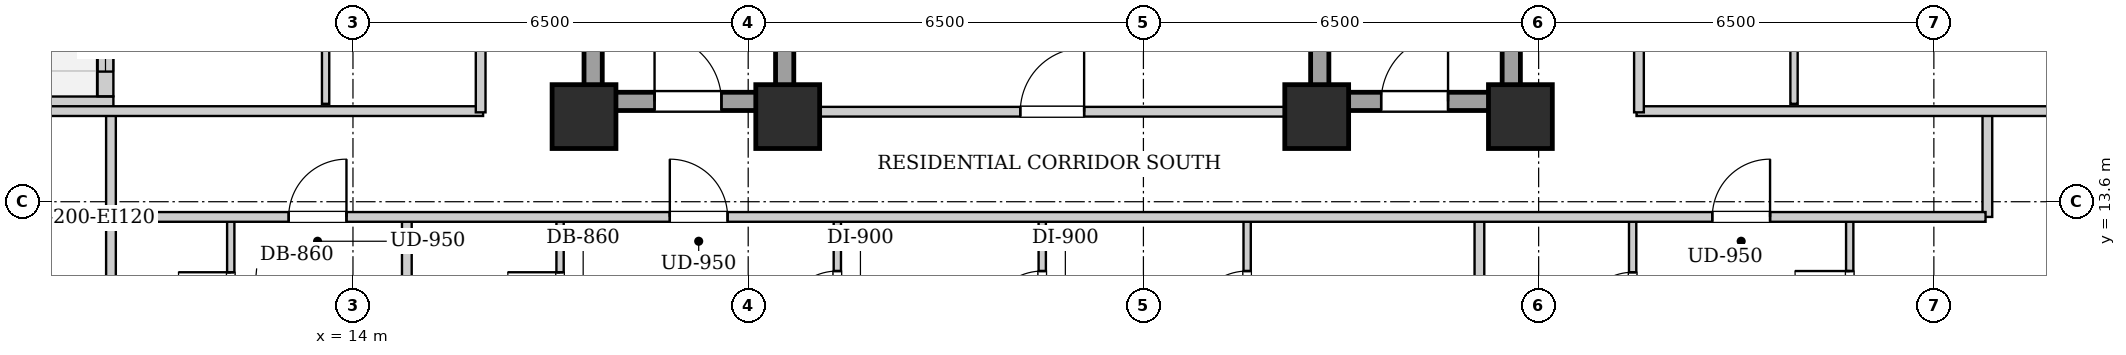
"""IFC4 building model, lengths in metres.
Left out: names, types, materials, properties, quantities, classifications, styles, units other than length and angle.
Written with IfcOpenShell. Run it as: python <this file> out.ifc"""

import sys

from ifc_helpers import new_model, si_unit, direction, frame, frame_2d, origin, origin_2d, place, context, subcontext, project, spatial, rectangle, extrude, element, fill, save


model = new_model("IFC4")
c1 = context("Model", 3, precision=1e-05, world=origin(), true_north=direction((0.0, 1.0)))
c2 = subcontext(c1, "Body", "Model", "MODEL_VIEW")
j1 = project(units=[si_unit("LENGTHUNIT", "METRE"), si_unit("PLANEANGLEUNIT", "RADIAN")], contexts=[c1])
p1 = place(None, origin())
s1 = spatial("IfcSite", under=j1, at=p1, CompositionType="ELEMENT")
p2 = place(p1, origin())
s2 = spatial("IfcBuilding", under=s1, at=p2, CompositionType="ELEMENT")
p3 = place(p2, frame((0.0, 0.0, 107.1)))
s3 = spatial("IfcBuildingStorey", under=s2, at=p3, CompositionType="ELEMENT", Elevation=107.1)
for number, where, z_axis, x_axis in (
    (1, (17.8, 15.0, 0.0), (0.0, 0.0, 1.0), (1.0, 0.0, 0.0)),
    (2, (21.15, 15.0, 0.0), (0.0, 0.0, 1.0), (1.0, 0.0, 0.0)),
    (3, (29.85, 15.0, 0.0), (0.0, 0.0, 1.0), (1.0, 0.0, 0.0)),
    (4, (33.2, 15.0, 0.0), (0.0, 0.0, 1.0), (1.0, 0.0, 0.0)),
):
    element("IfcColumn", number, at=place(p3, frame(where, z_axis=z_axis, x_axis=x_axis)), inside=s3, PredefinedType="COLUMN", context=c2, shape_type="SweptSolid", body=[
        extrude(rectangle(XDim=1.05, YDim=1.05, at=origin_2d()), origin(), (0.0, 0.0, 1.0), 3.2),
    ])
p4 = place(p3, frame((7.66, 15.2, 0.0), z_axis=(0.0, 0.0, 1.0), x_axis=(1.0, 0.0, 0.0)))
e5 = element("IfcWall", 5, at=p4, inside=s3, PredefinedType="SOLIDWALL", context=c2, shape_type="SweptSolid", body=[
    extrude(rectangle(XDim=2.4, YDim=0.26, at=frame_2d((1.2, 0.0))), origin(), (0.0, 0.0, 1.0), 2.94),
])
p5 = place(p3, frame((9.93, 15.334, 0.0), z_axis=(0.0, 0.0, 1.0), x_axis=(0.0, 1.0, 0.0)))
e6 = element("IfcWall", 6, at=p5, inside=s3, PredefinedType="SOLIDWALL", context=c2, shape_type="SweptSolid", body=[
    extrude(rectangle(XDim=3.932, YDim=0.26, at=frame_2d((1.966, 0.0))), origin(), (0.0, 0.0, 1.0), 2.94),
])
p6 = place(p5, frame((1.416, 0.0, 0.0)))
e7 = element("IfcOpeningElement", 7, at=p6, cuts=e6, PredefinedType="OPENING", context=c2, shape_type="SweptSolid", body=[
    extrude(rectangle(XDim=1.1, YDim=2.0, at=frame_2d((0.55, 1.0))), frame((0.0, 0.14, 0.0), z_axis=(0.0, -1.0, 0.0), x_axis=(1.0, 0.0, 0.0)), (0.0, 0.0, 1.0), 0.28),
])
p7 = place(p5, frame((0.406, 0.0, 0.55)))
e8 = element("IfcOpeningElement", 8, at=p7, cuts=e6, PredefinedType="OPENING", context=c2, shape_type="SweptSolid", body=[
    extrude(rectangle(XDim=0.85, YDim=1.2, at=frame_2d((0.425, 0.6))), frame((0.0, 0.14, 0.0), z_axis=(0.0, -1.0, 0.0), x_axis=(1.0, 0.0, 0.0)), (0.0, 0.0, 1.0), 0.28),
])
for number, where, z_axis, x_axis in (
    (9, (17.95, 15.1, 0.0), (0.0, 0.0, 1.0), (0.0, 1.0, 0.0)),
    (10, (21.1, 15.1, 0.0), (0.0, 0.0, 1.0), (0.0, 1.0, 0.0)),
):
    element("IfcWall", number, at=place(p3, frame(where, z_axis=z_axis, x_axis=x_axis)), inside=s3, PredefinedType="SHEAR", context=c2, shape_type="SweptSolid", body=[
        extrude(rectangle(XDim=9.0, YDim=0.3, at=frame_2d((4.5, 0.0))), origin(), (0.0, 0.0, 1.0), 2.94),
    ])
p8 = place(p3, frame((18.1, 15.25, 0.0), z_axis=(0.0, 0.0, 1.0), x_axis=(1.0, 0.0, 0.0)))
e11 = element("IfcWall", 11, at=p8, inside=s3, PredefinedType="SHEAR", context=c2, shape_type="SweptSolid", body=[
    extrude(rectangle(XDim=2.85, YDim=0.3, at=frame_2d((1.425, 0.0))), origin(), (0.0, 0.0, 1.0), 2.94),
])
p9 = place(p8, frame((0.86, 0.0, 0.0)))
e12 = element("IfcOpeningElement", 12, at=p9, cuts=e11, PredefinedType="OPENING", context=c2, shape_type="SweptSolid", body=[
    extrude(rectangle(XDim=1.1, YDim=2.05, at=frame_2d((0.55, 1.025))), frame((0.0, 0.16, 0.0), z_axis=(0.0, -1.0, 0.0), x_axis=(1.0, 0.0, 0.0)), (0.0, 0.0, 1.0), 0.32),
])
for number, where, z_axis, x_axis in (
    (13, (29.9, 15.1, 0.0), (0.0, 0.0, 1.0), (0.0, 1.0, 0.0)),
    (14, (33.05, 15.1, 0.0), (0.0, 0.0, 1.0), (0.0, 1.0, 0.0)),
):
    element("IfcWall", number, at=place(p3, frame(where, z_axis=z_axis, x_axis=x_axis)), inside=s3, PredefinedType="SHEAR", context=c2, shape_type="SweptSolid", body=[
        extrude(rectangle(XDim=9.0, YDim=0.3, at=frame_2d((4.5, 0.0))), origin(), (0.0, 0.0, 1.0), 2.94),
    ])
p10 = place(p3, frame((30.05, 15.25, 0.0), z_axis=(0.0, 0.0, 1.0), x_axis=(1.0, 0.0, 0.0)))
e15 = element("IfcWall", 15, at=p10, inside=s3, PredefinedType="SHEAR", context=c2, shape_type="SweptSolid", body=[
    extrude(rectangle(XDim=2.85, YDim=0.3, at=frame_2d((1.425, 0.0))), origin(), (0.0, 0.0, 1.0), 2.94),
])
p11 = place(p10, frame((0.86, 0.0, 0.0)))
e16 = element("IfcOpeningElement", 16, at=p11, cuts=e15, PredefinedType="OPENING", context=c2, shape_type="SweptSolid", body=[
    extrude(rectangle(XDim=1.1, YDim=2.05, at=frame_2d((0.55, 1.025))), frame((0.0, 0.16, 0.0), z_axis=(0.0, -1.0, 0.0), x_axis=(1.0, 0.0, 0.0)), (0.0, 0.0, 1.0), 0.32),
])
p12 = place(p3, frame((21.25, 15.08, 0.0), z_axis=(0.0, 0.0, 1.0), x_axis=(1.0, 0.0, 0.0)))
e17 = element("IfcWall", 17, at=p12, inside=s3, PredefinedType="PARTITIONING", context=c2, shape_type="SweptSolid", body=[
    extrude(rectangle(XDim=8.5, YDim=0.16, at=frame_2d((4.25, 0.0))), origin(), (0.0, 0.0, 1.0), 2.313),
])
p13 = place(p12, frame((3.725, 0.0, 0.0)))
e18 = element("IfcOpeningElement", 18, at=p13, cuts=e17, PredefinedType="OPENING", context=c2, shape_type="SweptSolid", body=[
    extrude(rectangle(XDim=1.05, YDim=2.05, at=frame_2d((0.525, 1.025))), frame((0.0, 0.09, 0.0), z_axis=(0.0, -1.0, 0.0), x_axis=(1.0, 0.0, 0.0)), (0.0, 0.0, 1.0), 0.18),
])
for number, where, z_axis, x_axis in (
    (19, (10.02, 13.35, 0.0), (0.0, 0.0, 1.0), (0.0, 1.0, 0.0)),
    (20, (40.88, 13.35, 0.0), (0.0, 0.0, 1.0), (0.0, 1.0, 0.0)),
):
    element("IfcWall", number, at=place(p3, frame(where, z_axis=z_axis, x_axis=x_axis)), inside=s3, PredefinedType="PARTITIONING", context=c2, shape_type="SweptSolid", body=[
        extrude(rectangle(XDim=1.74, YDim=0.16, at=frame_2d((0.87, 0.0))), origin(), (0.0, 0.0, 1.0), 2.94),
    ])
p14 = place(p3, frame((7.78, 15.09, 0.0), z_axis=(0.0, 0.0, 1.0), x_axis=(1.0, 0.0, 0.0)))
e21 = element("IfcWall", 21, at=p14, inside=s3, PredefinedType="PARTITIONING", context=c2, shape_type="SweptSolid", body=[
    extrude(rectangle(XDim=8.36, YDim=0.16, at=frame_2d((4.18, 0.0))), origin(), (0.0, 0.0, 1.0), 2.313),
])
p15 = place(p3, frame((35.11, 15.09, 0.0), z_axis=(0.0, 0.0, 1.0), x_axis=(1.0, 0.0, 0.0)))
e22 = element("IfcWall", 22, at=p15, inside=s3, PredefinedType="PARTITIONING", context=c2, shape_type="SweptSolid", body=[
    extrude(rectangle(XDim=8.01, YDim=0.16, at=frame_2d((4.005, 0.0))), origin(), (0.0, 0.0, 1.0), 2.313),
])
p16 = place(p3, frame((10.02, 10.65, 0.0), z_axis=(0.0, 0.0, 1.0), x_axis=(0.0, 1.0, 0.0)))
e23 = element("IfcWall", 23, at=p16, inside=s3, PredefinedType="PARTITIONING", context=c2, shape_type="SweptSolid", body=[
    extrude(rectangle(XDim=2.66, YDim=0.16, at=frame_2d((1.33, 0.0))), origin(), (0.0, 0.0, 1.0), 2.94),
])
p17 = place(p3, frame((11.99, 10.71, 0.0), z_axis=(0.0, 0.0, 1.0), x_axis=(0.0, 1.0, 0.0)))
e24 = element("IfcWall", 24, at=p17, inside=s3, PredefinedType="PARTITIONING", context=c2, shape_type="SweptSolid", body=[
    extrude(rectangle(XDim=2.6, YDim=0.12, at=frame_2d((1.3, 0.0))), origin(), (0.0, 0.0, 1.0), 2.94),
])
p18 = place(p17, frame((0.87, 0.0, 0.0)))
e25 = element("IfcOpeningElement", 25, at=p18, cuts=e24, PredefinedType="OPENING", context=c2, shape_type="SweptSolid", body=[
    extrude(rectangle(XDim=0.86, YDim=2.05, at=frame_2d((0.43, 1.025))), frame((0.0, 0.07, 0.0), z_axis=(0.0, -1.0, 0.0), x_axis=(1.0, 0.0, 0.0)), (0.0, 0.0, 1.0), 0.14),
])
p19 = place(p3, frame((14.886, 2.26, 0.0), z_axis=(0.0, 0.0, 1.0), x_axis=(0.0, 1.0, 0.0)))
e26 = element("IfcWall", 26, at=p19, inside=s3, PredefinedType="PARTITIONING", context=c2, shape_type="SweptSolid", body=[
    extrude(rectangle(XDim=11.05, YDim=0.16, at=frame_2d((5.525, 0.0))), origin(), (0.0, 0.0, 1.0), 2.94),
])
p20 = place(p3, frame((17.406, 10.71, 0.0), z_axis=(0.0, 0.0, 1.0), x_axis=(0.0, 1.0, 0.0)))
e27 = element("IfcWall", 27, at=p20, inside=s3, PredefinedType="PARTITIONING", context=c2, shape_type="SweptSolid", body=[
    extrude(rectangle(XDim=2.6, YDim=0.12, at=frame_2d((1.3, 0.0))), origin(), (0.0, 0.0, 1.0), 2.94),
])
p21 = place(p20, frame((0.87, 0.0, 0.0)))
e28 = element("IfcOpeningElement", 28, at=p21, cuts=e27, PredefinedType="OPENING", context=c2, shape_type="SweptSolid", body=[
    extrude(rectangle(XDim=0.86, YDim=2.05, at=frame_2d((0.43, 1.025))), frame((0.0, 0.07, 0.0), z_axis=(0.0, -1.0, 0.0), x_axis=(1.0, 0.0, 0.0)), (0.0, 0.0, 1.0), 0.14),
])
p22 = place(p3, frame((21.966, 10.71, 0.0), z_axis=(0.0, 0.0, 1.0), x_axis=(0.0, 1.0, 0.0)))
e29 = element("IfcWall", 29, at=p22, inside=s3, PredefinedType="PARTITIONING", context=c2, shape_type="SweptSolid", body=[
    extrude(rectangle(XDim=2.6, YDim=0.12, at=frame_2d((1.3, 0.0))), origin(), (0.0, 0.0, 1.0), 2.94),
])
p23 = place(p22, frame((0.85, 0.0, 0.0)))
e30 = element("IfcOpeningElement", 30, at=p23, cuts=e29, PredefinedType="OPENING", context=c2, shape_type="SweptSolid", body=[
    extrude(rectangle(XDim=0.9, YDim=2.05, at=frame_2d((0.45, 1.025))), frame((0.0, 0.07, 0.0), z_axis=(0.0, -1.0, 0.0), x_axis=(1.0, 0.0, 0.0)), (0.0, 0.0, 1.0), 0.14),
])
p24 = place(p3, frame((25.336, 10.71, 0.0), z_axis=(0.0, 0.0, 1.0), x_axis=(0.0, 1.0, 0.0)))
e31 = element("IfcWall", 31, at=p24, inside=s3, PredefinedType="PARTITIONING", context=c2, shape_type="SweptSolid", body=[
    extrude(rectangle(XDim=2.6, YDim=0.12, at=frame_2d((1.3, 0.0))), origin(), (0.0, 0.0, 1.0), 2.94),
])
p25 = place(p24, frame((0.85, 0.0, 0.0)))
e32 = element("IfcOpeningElement", 32, at=p25, cuts=e31, PredefinedType="OPENING", context=c2, shape_type="SweptSolid", body=[
    extrude(rectangle(XDim=0.9, YDim=2.05, at=frame_2d((0.45, 1.025))), frame((0.0, 0.07, 0.0), z_axis=(0.0, -1.0, 0.0), x_axis=(1.0, 0.0, 0.0)), (0.0, 0.0, 1.0), 0.14),
])
p26 = place(p3, frame((28.706, 10.71, 0.0), z_axis=(0.0, 0.0, 1.0), x_axis=(0.0, 1.0, 0.0)))
e33 = element("IfcWall", 33, at=p26, inside=s3, PredefinedType="PARTITIONING", context=c2, shape_type="SweptSolid", body=[
    extrude(rectangle(XDim=2.6, YDim=0.12, at=frame_2d((1.3, 0.0))), origin(), (0.0, 0.0, 1.0), 2.94),
])
p27 = place(p26, frame((0.85, 0.0, 0.0)))
e34 = element("IfcOpeningElement", 34, at=p27, cuts=e33, PredefinedType="OPENING", context=c2, shape_type="SweptSolid", body=[
    extrude(rectangle(XDim=0.9, YDim=2.05, at=frame_2d((0.45, 1.025))), frame((0.0, 0.07, 0.0), z_axis=(0.0, -1.0, 0.0), x_axis=(1.0, 0.0, 0.0)), (0.0, 0.0, 1.0), 0.14),
])
p28 = place(p3, frame((32.526, 0.28, 0.0), z_axis=(0.0, 0.0, 1.0), x_axis=(0.0, 1.0, 0.0)))
e35 = element("IfcWall", 35, at=p28, inside=s3, PredefinedType="PARTITIONING", context=c2, shape_type="SweptSolid", body=[
    extrude(rectangle(XDim=13.03, YDim=0.16, at=frame_2d((6.515, 0.0))), origin(), (0.0, 0.0, 1.0), 2.94),
])
p29 = place(p3, frame((35.046, 10.71, 0.0), z_axis=(0.0, 0.0, 1.0), x_axis=(0.0, 1.0, 0.0)))
e36 = element("IfcWall", 36, at=p29, inside=s3, PredefinedType="PARTITIONING", context=c2, shape_type="SweptSolid", body=[
    extrude(rectangle(XDim=2.6, YDim=0.12, at=frame_2d((1.3, 0.0))), origin(), (0.0, 0.0, 1.0), 2.94),
])
p30 = place(p29, frame((0.87, 0.0, 0.0)))
e37 = element("IfcOpeningElement", 37, at=p30, cuts=e36, PredefinedType="OPENING", context=c2, shape_type="SweptSolid", body=[
    extrude(rectangle(XDim=0.86, YDim=2.05, at=frame_2d((0.43, 1.025))), frame((0.0, 0.07, 0.0), z_axis=(0.0, -1.0, 0.0), x_axis=(1.0, 0.0, 0.0)), (0.0, 0.0, 1.0), 0.14),
])
p31 = place(p3, frame((38.616, 10.71, 0.0), z_axis=(0.0, 0.0, 1.0), x_axis=(0.0, 1.0, 0.0)))
e38 = element("IfcWall", 38, at=p31, inside=s3, PredefinedType="PARTITIONING", context=c2, shape_type="SweptSolid", body=[
    extrude(rectangle(XDim=2.6, YDim=0.12, at=frame_2d((1.3, 0.0))), origin(), (0.0, 0.0, 1.0), 2.94),
])
p32 = place(p31, frame((0.85, 0.0, 0.0)))
e39 = element("IfcOpeningElement", 39, at=p32, cuts=e38, PredefinedType="OPENING", context=c2, shape_type="SweptSolid", body=[
    extrude(rectangle(XDim=0.9, YDim=2.05, at=frame_2d((0.45, 1.025))), frame((0.0, 0.07, 0.0), z_axis=(0.0, -1.0, 0.0), x_axis=(1.0, 0.0, 0.0)), (0.0, 0.0, 1.0), 0.14),
])
p33 = place(p3, frame((13.55, 15.21, 0.0), z_axis=(0.0, 0.0, 1.0), x_axis=(0.0, 1.0, 0.0)))
e40 = element("IfcWall", 40, at=p33, inside=s3, PredefinedType="PARTITIONING", context=c2, shape_type="SweptSolid", body=[
    extrude(rectangle(XDim=2.3, YDim=0.12, at=frame_2d((1.15, 0.0))), origin(), (0.0, 0.0, 1.0), 2.94),
])
p34 = place(p3, frame((37.7, 15.21, 0.0), z_axis=(0.0, 0.0, 1.0), x_axis=(0.0, 1.0, 0.0)))
e41 = element("IfcWall", 41, at=p34, inside=s3, PredefinedType="PARTITIONING", context=c2, shape_type="SweptSolid", body=[
    extrude(rectangle(XDim=1.85, YDim=0.12, at=frame_2d((0.925, 0.0))), origin(), (0.0, 0.0, 1.0), 2.94),
])
p35 = place(p3, frame((10.05, 13.35, 0.0), z_axis=(0.0, 0.0, 1.0), x_axis=(1.0, 0.0, 0.0)))
e42 = element("IfcWall", 42, at=p35, inside=s3, PredefinedType="PARTITIONING", context=c2, shape_type="SweptSolid", body=[
    extrude(rectangle(XDim=30.8, YDim=0.16, at=frame_2d((15.4, 0.0))), origin(), (0.0, 0.0, 1.0), 2.94),
])
p36 = place(p35, frame((2.893, 0.0, 0.0)))
e43 = element("IfcOpeningElement", 43, at=p36, cuts=e42, PredefinedType="OPENING", context=c2, shape_type="SweptSolid", body=[
    extrude(rectangle(XDim=0.95, YDim=2.1, at=frame_2d((0.475, 1.05))), frame((0.0, 0.09, 0.0), z_axis=(0.0, -1.0, 0.0), x_axis=(1.0, 0.0, 0.0)), (0.0, 0.0, 1.0), 0.18),
])
p37 = place(p35, frame((9.161, 0.0, 0.0)))
e44 = element("IfcOpeningElement", 44, at=p37, cuts=e42, PredefinedType="OPENING", context=c2, shape_type="SweptSolid", body=[
    extrude(rectangle(XDim=0.95, YDim=2.1, at=frame_2d((0.475, 1.05))), frame((0.0, 0.09, 0.0), z_axis=(0.0, -1.0, 0.0), x_axis=(1.0, 0.0, 0.0)), (0.0, 0.0, 1.0), 0.18),
])
p38 = place(p35, frame((26.306, 0.0, 0.0)))
e45 = element("IfcOpeningElement", 45, at=p38, cuts=e42, PredefinedType="OPENING", context=c2, shape_type="SweptSolid", body=[
    extrude(rectangle(XDim=0.95, YDim=2.1, at=frame_2d((0.475, 1.05))), frame((0.0, 0.09, 0.0), z_axis=(0.0, -1.0, 0.0), x_axis=(1.0, 0.0, 0.0)), (0.0, 0.0, 1.0), 0.18),
])
p39 = place(p3, frame((16.1, 15.07, 0.0), z_axis=(0.0, 0.0, 1.0), x_axis=(0.0, 1.0, 0.0)))
e46 = element("IfcWall", 46, at=p39, inside=s3, PredefinedType="PARTITIONING", context=c2, shape_type="SweptSolid", body=[
    extrude(rectangle(XDim=13.93, YDim=0.16, at=frame_2d((6.965, 0.0))), origin(), (0.0, 0.0, 1.0), 2.94),
])
p40 = place(p39, frame((4.385, 0.0, 0.0)))
e47 = element("IfcOpeningElement", 47, at=p40, cuts=e46, PredefinedType="OPENING", context=c2, shape_type="SweptSolid", body=[
    extrude(rectangle(XDim=0.95, YDim=2.1, at=frame_2d((0.475, 1.05))), frame((0.0, 0.09, 0.0), z_axis=(0.0, -1.0, 0.0), x_axis=(1.0, 0.0, 0.0)), (0.0, 0.0, 1.0), 0.18),
])
p41 = place(p3, frame((35.15, 15.07, 0.0), z_axis=(0.0, 0.0, 1.0), x_axis=(0.0, 1.0, 0.0)))
e48 = element("IfcWall", 48, at=p41, inside=s3, PredefinedType="PARTITIONING", context=c2, shape_type="SweptSolid", body=[
    extrude(rectangle(XDim=13.93, YDim=0.16, at=frame_2d((6.965, 0.0))), origin(), (0.0, 0.0, 1.0), 2.94),
])
p42 = place(p41, frame((3.608, 0.0, 0.0)))
e49 = element("IfcOpeningElement", 49, at=p42, cuts=e48, PredefinedType="OPENING", context=c2, shape_type="SweptSolid", body=[
    extrude(rectangle(XDim=0.95, YDim=2.1, at=frame_2d((0.475, 1.05))), frame((0.0, 0.09, 0.0), z_axis=(0.0, -1.0, 0.0), x_axis=(1.0, 0.0, 0.0)), (0.0, 0.0, 1.0), 0.18),
])
p43 = place(p41, frame((10.649, 0.0, 0.0)))
e50 = element("IfcOpeningElement", 50, at=p43, cuts=e48, PredefinedType="OPENING", context=c2, shape_type="SweptSolid", body=[
    extrude(rectangle(XDim=0.95, YDim=2.1, at=frame_2d((0.475, 1.05))), frame((0.0, 0.09, 0.0), z_axis=(0.0, -1.0, 0.0), x_axis=(1.0, 0.0, 0.0)), (0.0, 0.0, 1.0), 0.18),
])
p44 = place(p9, origin())
e51 = element("IfcDoor", 51, at=p44, inside=s3, OperationType="SINGLE_SWING_LEFT", PredefinedType="DOOR", context=c2, shape_type="SweptSolid", body=[
    extrude(rectangle(XDim=1.1, YDim=2.05, at=frame_2d((0.55, 1.025))), frame((0.0, 0.025, 0.0), z_axis=(0.0, -1.0, 0.0), x_axis=(1.0, 0.0, 0.0)), (0.0, 0.0, 1.0), 0.05),
])
fill(e12, e51)
p45 = place(p11, origin())
e52 = element("IfcDoor", 52, at=p45, inside=s3, OperationType="SINGLE_SWING_RIGHT", PredefinedType="DOOR", context=c2, shape_type="SweptSolid", body=[
    extrude(rectangle(XDim=1.1, YDim=2.05, at=frame_2d((0.55, 1.025))), frame((0.0, 0.025, 0.0), z_axis=(0.0, -1.0, 0.0), x_axis=(1.0, 0.0, 0.0)), (0.0, 0.0, 1.0), 0.05),
])
fill(e16, e52)
p46 = place(p13, origin())
e53 = element("IfcDoor", 53, at=p46, inside=s3, OperationType="SINGLE_SWING_RIGHT", PredefinedType="DOOR", context=c2, shape_type="SweptSolid", body=[
    extrude(rectangle(XDim=1.05, YDim=2.05, at=frame_2d((0.525, 1.025))), frame((0.0, 0.025, 0.0), z_axis=(0.0, -1.0, 0.0), x_axis=(1.0, 0.0, 0.0)), (0.0, 0.0, 1.0), 0.05),
])
fill(e18, e53)
p47 = place(p18, origin())
e54 = element("IfcDoor", 54, at=p47, inside=s3, OperationType="SINGLE_SWING_RIGHT", PredefinedType="DOOR", context=c2, shape_type="SweptSolid", body=[
    extrude(rectangle(XDim=0.86, YDim=2.05, at=frame_2d((0.43, 1.025))), frame((0.0, 0.025, 0.0), z_axis=(0.0, -1.0, 0.0), x_axis=(1.0, 0.0, 0.0)), (0.0, 0.0, 1.0), 0.05),
])
fill(e25, e54)
p48 = place(p21, origin())
e55 = element("IfcDoor", 55, at=p48, inside=s3, OperationType="SINGLE_SWING_RIGHT", PredefinedType="DOOR", context=c2, shape_type="SweptSolid", body=[
    extrude(rectangle(XDim=0.86, YDim=2.05, at=frame_2d((0.43, 1.025))), frame((0.0, 0.025, 0.0), z_axis=(0.0, -1.0, 0.0), x_axis=(1.0, 0.0, 0.0)), (0.0, 0.0, 1.0), 0.05),
])
fill(e28, e55)
p49 = place(p23, origin())
e56 = element("IfcDoor", 56, at=p49, inside=s3, OperationType="SINGLE_SWING_LEFT", PredefinedType="DOOR", context=c2, shape_type="SweptSolid", body=[
    extrude(rectangle(XDim=0.9, YDim=2.05, at=frame_2d((0.45, 1.025))), frame((0.0, 0.025, 0.0), z_axis=(0.0, -1.0, 0.0), x_axis=(1.0, 0.0, 0.0)), (0.0, 0.0, 1.0), 0.05),
])
fill(e30, e56)
p50 = place(p25, origin())
e57 = element("IfcDoor", 57, at=p50, inside=s3, OperationType="SINGLE_SWING_LEFT", PredefinedType="DOOR", context=c2, shape_type="SweptSolid", body=[
    extrude(rectangle(XDim=0.9, YDim=2.05, at=frame_2d((0.45, 1.025))), frame((0.0, 0.025, 0.0), z_axis=(0.0, -1.0, 0.0), x_axis=(1.0, 0.0, 0.0)), (0.0, 0.0, 1.0), 0.05),
])
fill(e32, e57)
p51 = place(p27, origin())
e58 = element("IfcDoor", 58, at=p51, inside=s3, OperationType="SINGLE_SWING_LEFT", PredefinedType="DOOR", context=c2, shape_type="SweptSolid", body=[
    extrude(rectangle(XDim=0.9, YDim=2.05, at=frame_2d((0.45, 1.025))), frame((0.0, 0.025, 0.0), z_axis=(0.0, -1.0, 0.0), x_axis=(1.0, 0.0, 0.0)), (0.0, 0.0, 1.0), 0.05),
])
fill(e34, e58)
p52 = place(p30, origin())
e59 = element("IfcDoor", 59, at=p52, inside=s3, OperationType="SINGLE_SWING_LEFT", PredefinedType="DOOR", context=c2, shape_type="SweptSolid", body=[
    extrude(rectangle(XDim=0.86, YDim=2.05, at=frame_2d((0.43, 1.025))), frame((0.0, 0.025, 0.0), z_axis=(0.0, -1.0, 0.0), x_axis=(1.0, 0.0, 0.0)), (0.0, 0.0, 1.0), 0.05),
])
fill(e37, e59)
p53 = place(p32, origin())
e60 = element("IfcDoor", 60, at=p53, inside=s3, OperationType="SINGLE_SWING_RIGHT", PredefinedType="DOOR", context=c2, shape_type="SweptSolid", body=[
    extrude(rectangle(XDim=0.9, YDim=2.05, at=frame_2d((0.45, 1.025))), frame((0.0, 0.025, 0.0), z_axis=(0.0, -1.0, 0.0), x_axis=(1.0, 0.0, 0.0)), (0.0, 0.0, 1.0), 0.05),
])
fill(e39, e60)
p54 = place(p36, origin())
e61 = element("IfcDoor", 61, at=p54, inside=s3, OperationType="SINGLE_SWING_RIGHT", PredefinedType="DOOR", context=c2, shape_type="SweptSolid", body=[
    extrude(rectangle(XDim=0.95, YDim=2.1, at=frame_2d((0.475, 1.05))), frame((0.0, 0.025, 0.0), z_axis=(0.0, -1.0, 0.0), x_axis=(1.0, 0.0, 0.0)), (0.0, 0.0, 1.0), 0.05),
])
fill(e43, e61)
p55 = place(p37, origin())
e62 = element("IfcDoor", 62, at=p55, inside=s3, OperationType="SINGLE_SWING_LEFT", PredefinedType="DOOR", context=c2, shape_type="SweptSolid", body=[
    extrude(rectangle(XDim=0.95, YDim=2.1, at=frame_2d((0.475, 1.05))), frame((0.0, 0.025, 0.0), z_axis=(0.0, -1.0, 0.0), x_axis=(1.0, 0.0, 0.0)), (0.0, 0.0, 1.0), 0.05),
])
fill(e44, e62)
p56 = place(p38, origin())
e63 = element("IfcDoor", 63, at=p56, inside=s3, OperationType="SINGLE_SWING_RIGHT", PredefinedType="DOOR", context=c2, shape_type="SweptSolid", body=[
    extrude(rectangle(XDim=0.95, YDim=2.1, at=frame_2d((0.475, 1.05))), frame((0.0, 0.025, 0.0), z_axis=(0.0, -1.0, 0.0), x_axis=(1.0, 0.0, 0.0)), (0.0, 0.0, 1.0), 0.05),
])
fill(e45, e63)
p57 = place(p7, origin())
e64 = element("IfcWindow", 64, at=p57, inside=s3, PartitioningType="SINGLE_PANEL", PredefinedType="WINDOW", context=c2, shape_type="SweptSolid", body=[
    extrude(rectangle(XDim=0.85, YDim=1.2, at=frame_2d((0.425, 0.6))), frame((0.0, 0.03, 0.0), z_axis=(0.0, -1.0, 0.0), x_axis=(1.0, 0.0, 0.0)), (0.0, 0.0, 1.0), 0.06),
])
fill(e8, e64)
save(model, sys.argv[1])
